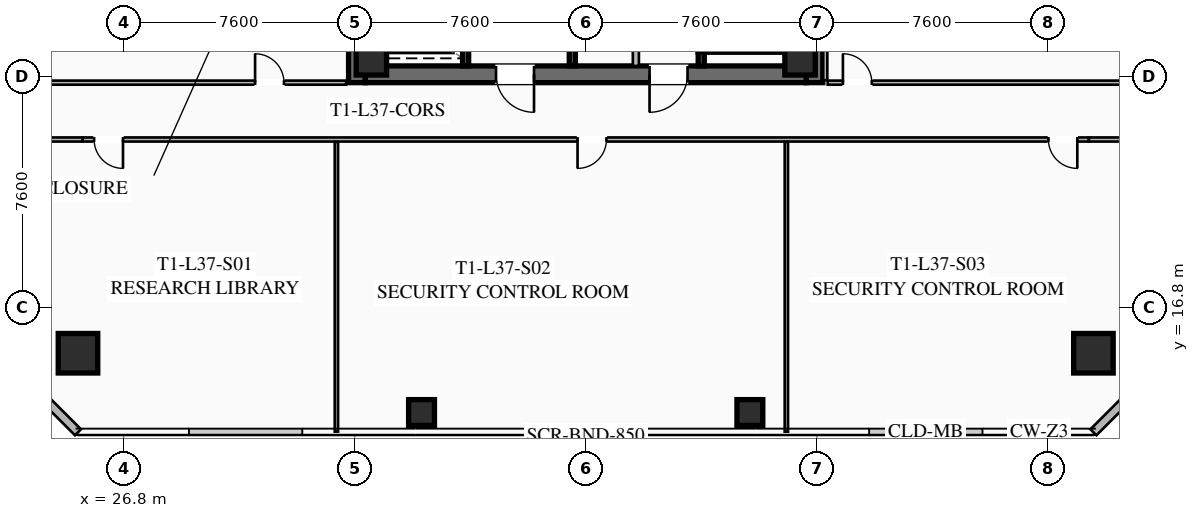
"""IFC4 building model, lengths in metres.
Left out: names, types, materials, properties, quantities, classifications, styles, units other than length and angle.
Written with IfcOpenShell. Run it as: python <this file> out.ifc"""

import sys

from ifc_helpers import new_model, si_unit, direction, frame, frame_2d, origin, origin_2d, place, context, subcontext, project, spatial, rectangle, hollow_rectangle, extrude, element, fill, save


model = new_model("IFC4")
c1 = context("Model", 3, precision=1e-05, world=origin(), true_north=direction((0.0, 1.0)))
c2 = subcontext(c1, "Body", "Model", "MODEL_VIEW")
j1 = project(units=[si_unit("LENGTHUNIT", "METRE"), si_unit("PLANEANGLEUNIT", "RADIAN")], contexts=[c1])
p1 = place(None, origin())
s1 = spatial("IfcSite", under=j1, at=p1, CompositionType="ELEMENT")
p2 = place(p1, origin())
s2 = spatial("IfcBuilding", under=s1, at=p2, CompositionType="ELEMENT")
p3 = place(p2, frame((0.0, 0.0, 139.25)))
s3 = spatial("IfcBuildingStorey", under=s2, at=p3, CompositionType="ELEMENT", Elevation=139.25)
for number, where, z_axis, x_axis in (
    (1, (34.475, 24.2, 0.0), (0.0, 0.0, 1.0), (0.0, 1.0, 0.0)),
    (2, (49.525, 39.8, 0.0), (0.0, 0.0, 1.0), (0.0, -1.0, 0.0)),
):
    element("IfcWall", number, at=place(p3, frame(where, z_axis=z_axis, x_axis=x_axis)), inside=s3, PredefinedType="SHEAR", context=c2, shape_type="SweptSolid", body=[
        extrude(rectangle(XDim=15.6, YDim=0.55, at=frame_2d((7.8, 0.0))), origin(), (0.0, 0.0, 1.0), 3.55),
    ])
p4 = place(p3, frame((49.25, 24.475, 0.0), z_axis=(0.0, 0.0, 1.0), x_axis=(-1.0, 0.0, 0.0)))
e3 = element("IfcWall", 3, at=p4, inside=s3, PredefinedType="SHEAR", context=c2, shape_type="SweptSolid", body=[
    extrude(rectangle(XDim=14.5, YDim=0.55, at=frame_2d((7.25, 0.0))), origin(), (0.0, 0.0, 1.0), 3.55),
])
p5 = place(p4, frame((8.95, 0.0, 0.0)))
e4 = element("IfcOpeningElement", 4, at=p5, cuts=e3, PredefinedType="OPENING", context=c2, shape_type="SweptSolid", body=[
    extrude(rectangle(XDim=1.25, YDim=2.25, at=frame_2d((0.625, 1.125))), frame((0.0, 0.285, 0.0), z_axis=(0.0, -1.0, 0.0), x_axis=(1.0, 0.0, 0.0)), (0.0, 0.0, 1.0), 0.57),
])
p6 = place(p4, frame((3.9, 0.0, 0.0)))
e5 = element("IfcOpeningElement", 5, at=p6, cuts=e3, PredefinedType="OPENING", context=c2, shape_type="SweptSolid", body=[
    extrude(rectangle(XDim=1.25, YDim=2.25, at=frame_2d((0.625, 1.125))), frame((0.0, 0.285, 0.0), z_axis=(0.0, -1.0, 0.0), x_axis=(1.0, 0.0, 0.0)), (0.0, 0.0, 1.0), 0.57),
])
for number, where, z_axis, x_axis in (
    (6, (34.95, 24.95, 0.0), (0.0, 0.0, 1.0), (1.0, 0.0, 0.0)),
    (7, (49.05, 24.95, 0.0), (0.0, 0.0, 1.0), (1.0, 0.0, 0.0)),
):
    element("IfcColumn", number, at=place(p3, frame(where, z_axis=z_axis, x_axis=x_axis)), inside=s3, PredefinedType="COLUMN", context=c2, shape_type="SweptSolid", body=[
        extrude(hollow_rectangle(XDim=1.0, YDim=1.0, WallThickness=0.04, at=origin_2d()), origin(), (0.0, 0.0, 1.0), 3.37),
    ])
for number, where, z_axis, x_axis in (
    (8, (25.3, 15.3, 0.0), (0.0, 0.0, 1.0), (1.0, 0.0, 0.0)),
    (9, (58.7, 15.3, 0.0), (0.0, 0.0, 1.0), (1.0, 0.0, 0.0)),
):
    element("IfcColumn", number, at=place(p3, frame(where, z_axis=z_axis, x_axis=x_axis)), inside=s3, PredefinedType="COLUMN", context=c2, shape_type="SweptSolid", body=[
        extrude(hollow_rectangle(XDim=1.3, YDim=1.3, WallThickness=0.05, at=origin_2d()), origin(), (0.0, 0.0, 1.0), 3.37),
    ])
for number, where, z_axis, x_axis in (
    (10, (36.6, 13.35, 0.0), (0.0, 0.0, 1.0), (1.0, 0.0, 0.0)),
    (11, (47.4, 13.35, 0.0), (0.0, 0.0, 1.0), (1.0, 0.0, 0.0)),
):
    element("IfcColumn", number, at=place(p3, frame(where, z_axis=z_axis, x_axis=x_axis)), inside=s3, PredefinedType="COLUMN", context=c2, shape_type="SweptSolid", body=[
        extrude(hollow_rectangle(XDim=0.85, YDim=0.85, WallThickness=0.035, at=origin_2d()), origin(), (0.0, 0.0, 1.0), 3.37),
    ])
for number, where, z_axis, x_axis in (
    (12, (25.3, 12.7, 0.0), (0.0, 0.0, 1.0), (-0.707, 0.707, 0.0)),
    (13, (61.3, 15.3, 0.0), (0.0, 0.0, 1.0), (-0.707, -0.707, 0.0)),
):
    element("IfcWall", number, at=place(p3, frame(where, z_axis=z_axis, x_axis=x_axis)), inside=s3, PredefinedType="SOLIDWALL", context=c2, shape_type="SweptSolid", body=[
        extrude(rectangle(XDim=3.677, YDim=0.28, at=frame_2d((1.838, 0.0))), origin(), (0.0, 0.0, 1.0), 3.37),
    ])
p7 = place(p3, frame((45.8, 32.8, 0.0), z_axis=(0.0, 0.0, 1.0), x_axis=(0.0, -1.0, 0.0)))
e14 = element("IfcWall", 14, at=p7, inside=s3, PredefinedType="SHEAR", context=c2, shape_type="SweptSolid", body=[
    extrude(rectangle(XDim=8.05, YDim=0.2, at=frame_2d((4.025, 0.0))), origin(), (0.0, 0.0, 1.0), 3.37),
])
p8 = place(p7, frame((0.45, 0.0, 0.0)))
e15 = element("IfcOpeningElement", 15, at=p8, cuts=e14, PredefinedType="OPENING", context=c2, shape_type="SweptSolid", body=[
    extrude(rectangle(XDim=1.15, YDim=2.2, at=frame_2d((0.575, 1.1))), frame((0.0, 0.11, 0.0), z_axis=(0.0, -1.0, 0.0), x_axis=(1.0, 0.0, 0.0)), (0.0, 0.0, 1.0), 0.22),
])
p9 = place(p3, frame((41.56, 24.75, 0.0), z_axis=(0.0, 0.0, 1.0), x_axis=(0.0, 1.0, 0.0)))
e16 = element("IfcWall", 16, at=p9, inside=s3, PredefinedType="SHEAR", context=c2, shape_type="SweptSolid", body=[
    extrude(rectangle(XDim=14.5, YDim=0.2, at=frame_2d((7.25, 0.0))), origin(), (0.0, 0.0, 1.0), 3.37),
])
p10 = place(p3, frame((38.05, 24.75, 0.0), z_axis=(0.0, 0.0, 1.0), x_axis=(0.0, 1.0, 0.0)))
e17 = element("IfcWall", 17, at=p10, inside=s3, PredefinedType="SHEAR", context=c2, shape_type="SweptSolid", body=[
    extrude(rectangle(XDim=6.45, YDim=0.2, at=frame_2d((3.225, 0.0))), origin(), (0.0, 0.0, 1.0), 3.37),
])
p11 = place(p10, frame((4.875, 0.0, 0.0)))
e18 = element("IfcOpeningElement", 18, at=p11, cuts=e17, PredefinedType="OPENING", context=c2, shape_type="SweptSolid", body=[
    extrude(rectangle(XDim=1.3, YDim=2.25, at=frame_2d((0.65, 1.125))), frame((0.0, 0.11, 0.0), z_axis=(0.0, -1.0, 0.0), x_axis=(1.0, 0.0, 0.0)), (0.0, 0.0, 1.0), 0.22),
])
p12 = place(p10, frame((2.875, 0.0, 0.0)))
e19 = element("IfcOpeningElement", 19, at=p12, cuts=e17, PredefinedType="OPENING", context=c2, shape_type="SweptSolid", body=[
    extrude(rectangle(XDim=1.3, YDim=2.25, at=frame_2d((0.65, 1.125))), frame((0.0, 0.11, 0.0), z_axis=(0.0, -1.0, 0.0), x_axis=(1.0, 0.0, 0.0)), (0.0, 0.0, 1.0), 0.22),
])
p13 = place(p10, frame((0.675, 0.0, 0.0)))
e20 = element("IfcOpeningElement", 20, at=p13, cuts=e17, PredefinedType="OPENING", context=c2, shape_type="SweptSolid", body=[
    extrude(rectangle(XDim=1.3, YDim=2.25, at=frame_2d((0.65, 1.125))), frame((0.0, 0.11, 0.0), z_axis=(0.0, -1.0, 0.0), x_axis=(1.0, 0.0, 0.0)), (0.0, 0.0, 1.0), 0.22),
])
p14 = place(p3, frame((43.65, 24.75, 0.0), z_axis=(0.0, 0.0, 1.0), x_axis=(0.0, 1.0, 0.0)))
e21 = element("IfcWall", 21, at=p14, inside=s3, PredefinedType="SOLIDWALL", context=c2, shape_type="SweptSolid", body=[
    extrude(rectangle(XDim=6.9, YDim=0.2, at=frame_2d((3.45, 0.0))), origin(), (0.0, 0.0, 1.0), 2.723),
])
p15 = place(p14, frame((0.85, 0.0, 0.0)))
e22 = element("IfcOpeningElement", 22, at=p15, cuts=e21, PredefinedType="OPENING", context=c2, shape_type="SweptSolid", body=[
    extrude(rectangle(XDim=0.95, YDim=2.05, at=frame_2d((0.475, 1.025))), frame((0.0, 0.11, 0.0), z_axis=(0.0, -1.0, 0.0), x_axis=(1.0, 0.0, 0.0)), (0.0, 0.0, 1.0), 0.22),
])
p16 = place(p14, frame((4.8, 0.0, 0.0)))
e23 = element("IfcOpeningElement", 23, at=p16, cuts=e21, PredefinedType="OPENING", context=c2, shape_type="SweptSolid", body=[
    extrude(rectangle(XDim=1.05, YDim=2.2, at=frame_2d((0.525, 1.1))), frame((0.0, 0.11, 0.0), z_axis=(0.0, -1.0, 0.0), x_axis=(1.0, 0.0, 0.0)), (0.0, 0.0, 1.0), 0.22),
])
p17 = place(p3, frame((58.55, 22.33, 0.0), z_axis=(0.0, 0.0, 1.0), x_axis=(-1.0, 0.0, 0.0)))
e24 = element("IfcWall", 24, at=p17, inside=s3, PredefinedType="PARTITIONING", context=c2, shape_type="SweptSolid", body=[
    extrude(rectangle(XDim=33.1, YDim=0.135, at=frame_2d((16.55, 0.0))), origin(), (0.0, 0.0, 1.0), 2.723),
])
p18 = place(p17, frame((31.77, 0.0, 0.0)))
e25 = element("IfcOpeningElement", 25, at=p18, cuts=e24, PredefinedType="OPENING", context=c2, shape_type="SweptSolid", body=[
    extrude(rectangle(XDim=0.95, YDim=2.05, at=frame_2d((0.475, 1.025))), frame((0.0, 0.077, 0.0), z_axis=(0.0, -1.0, 0.0), x_axis=(1.0, 0.0, 0.0)), (0.0, 0.0, 1.0), 0.155),
])
p19 = place(p17, frame((15.868, 0.0, 0.0)))
e26 = element("IfcOpeningElement", 26, at=p19, cuts=e24, PredefinedType="OPENING", context=c2, shape_type="SweptSolid", body=[
    extrude(rectangle(XDim=0.95, YDim=2.05, at=frame_2d((0.475, 1.025))), frame((0.0, 0.077, 0.0), z_axis=(0.0, -1.0, 0.0), x_axis=(1.0, 0.0, 0.0)), (0.0, 0.0, 1.0), 0.155),
])
p20 = place(p17, frame((0.38, 0.0, 0.0)))
e27 = element("IfcOpeningElement", 27, at=p20, cuts=e24, PredefinedType="OPENING", context=c2, shape_type="SweptSolid", body=[
    extrude(rectangle(XDim=0.95, YDim=2.05, at=frame_2d((0.475, 1.025))), frame((0.0, 0.077, 0.0), z_axis=(0.0, -1.0, 0.0), x_axis=(1.0, 0.0, 0.0)), (0.0, 0.0, 1.0), 0.155),
])
for number, where, z_axis, x_axis in (
    (28, (22.72, 22.33, 0.0), (0.0, 0.0, 1.0), (1.0, 0.0, 0.0)),
    (29, (58.55, 22.33, 0.0), (0.0, 0.0, 1.0), (1.0, 0.0, 0.0)),
):
    element("IfcWall", number, at=place(p3, frame(where, z_axis=z_axis, x_axis=x_axis)), inside=s3, PredefinedType="PARTITIONING", context=c2, shape_type="SweptSolid", body=[
        extrude(rectangle(XDim=2.73, YDim=0.135, at=frame_2d((1.365, 0.0))), origin(), (0.0, 0.0, 1.0), 2.723),
    ])
for number, where, z_axis, x_axis in (
    (30, (33.8, 12.72, 0.0), (0.0, 0.0, 1.0), (0.0, 1.0, 0.0)),
    (31, (48.6, 12.72, 0.0), (0.0, 0.0, 1.0), (0.0, 1.0, 0.0)),
):
    element("IfcWall", number, at=place(p3, frame(where, z_axis=z_axis, x_axis=x_axis)), inside=s3, PredefinedType="PARTITIONING", context=c2, shape_type="SweptSolid", body=[
        extrude(rectangle(XDim=9.53, YDim=0.11, at=frame_2d((4.765, 0.0))), origin(), (0.0, 0.0, 1.0), 2.723),
    ])
p21 = place(p3, frame((49.88, 39.72, 0.0), z_axis=(0.0, 0.0, 1.0), x_axis=(0.0, -1.0, 0.0)))
e32 = element("IfcWall", 32, at=p21, inside=s3, PredefinedType="PARTITIONING", context=c2, shape_type="SweptSolid", body=[
    extrude(rectangle(XDim=15.44, YDim=0.135, at=frame_2d((7.72, 0.0))), origin(), (0.0, 0.0, 1.0), 2.723),
])
p22 = place(p3, frame((49.96, 24.2, 0.0), z_axis=(0.0, 0.0, 1.0), x_axis=(1.0, 0.0, 0.0)))
e33 = element("IfcWall", 33, at=p22, inside=s3, PredefinedType="PARTITIONING", context=c2, shape_type="SweptSolid", body=[
    extrude(rectangle(XDim=11.32, YDim=0.135, at=frame_2d((5.66, 0.0))), origin(), (0.0, 0.0, 1.0), 2.723),
])
p23 = place(p22, frame((0.5, 0.0, 0.0)))
e34 = element("IfcOpeningElement", 34, at=p23, cuts=e33, PredefinedType="OPENING", context=c2, shape_type="SweptSolid", body=[
    extrude(rectangle(XDim=0.95, YDim=2.05, at=frame_2d((0.475, 1.025))), frame((0.0, 0.077, 0.0), z_axis=(0.0, -1.0, 0.0), x_axis=(1.0, 0.0, 0.0)), (0.0, 0.0, 1.0), 0.155),
])
p24 = place(p3, frame((22.72, 24.2, 0.0), z_axis=(0.0, 0.0, 1.0), x_axis=(1.0, 0.0, 0.0)))
e35 = element("IfcWall", 35, at=p24, inside=s3, PredefinedType="PARTITIONING", context=c2, shape_type="SweptSolid", body=[
    extrude(rectangle(XDim=11.4, YDim=0.135, at=frame_2d((5.7, 0.0))), origin(), (0.0, 0.0, 1.0), 2.723),
])
p25 = place(p24, frame((8.405, 0.0, 0.0)))
e36 = element("IfcOpeningElement", 36, at=p25, cuts=e35, PredefinedType="OPENING", context=c2, shape_type="SweptSolid", body=[
    extrude(rectangle(XDim=0.95, YDim=2.05, at=frame_2d((0.475, 1.025))), frame((0.0, 0.077, 0.0), z_axis=(0.0, -1.0, 0.0), x_axis=(1.0, 0.0, 0.0)), (0.0, 0.0, 1.0), 0.155),
])
p26 = place(p5, origin())
e37 = element("IfcDoor", 37, at=p26, inside=s3, OperationType="SINGLE_SWING_LEFT", PredefinedType="DOOR", context=c2, shape_type="SweptSolid", body=[
    extrude(rectangle(XDim=1.25, YDim=2.25, at=frame_2d((0.625, 1.125))), frame((0.0, 0.025, 0.0), z_axis=(0.0, -1.0, 0.0), x_axis=(1.0, 0.0, 0.0)), (0.0, 0.0, 1.0), 0.05),
])
fill(e4, e37)
p27 = place(p6, origin())
e38 = element("IfcDoor", 38, at=p27, inside=s3, OperationType="SINGLE_SWING_RIGHT", PredefinedType="DOOR", context=c2, shape_type="SweptSolid", body=[
    extrude(rectangle(XDim=1.25, YDim=2.25, at=frame_2d((0.625, 1.125))), frame((0.0, 0.025, 0.0), z_axis=(0.0, -1.0, 0.0), x_axis=(1.0, 0.0, 0.0)), (0.0, 0.0, 1.0), 0.05),
])
fill(e5, e38)
p28 = place(p18, origin())
e39 = element("IfcDoor", 39, at=p28, inside=s3, OperationType="SINGLE_SWING_LEFT", PredefinedType="DOOR", context=c2, shape_type="SweptSolid", body=[
    extrude(rectangle(XDim=0.95, YDim=2.05, at=frame_2d((0.475, 1.025))), frame((0.0, 0.025, 0.0), z_axis=(0.0, -1.0, 0.0), x_axis=(1.0, 0.0, 0.0)), (0.0, 0.0, 1.0), 0.05),
])
fill(e25, e39)
p29 = place(p19, origin())
e40 = element("IfcDoor", 40, at=p29, inside=s3, OperationType="SINGLE_SWING_RIGHT", PredefinedType="DOOR", context=c2, shape_type="SweptSolid", body=[
    extrude(rectangle(XDim=0.95, YDim=2.05, at=frame_2d((0.475, 1.025))), frame((0.0, 0.025, 0.0), z_axis=(0.0, -1.0, 0.0), x_axis=(1.0, 0.0, 0.0)), (0.0, 0.0, 1.0), 0.05),
])
fill(e26, e40)
p30 = place(p20, origin())
e41 = element("IfcDoor", 41, at=p30, inside=s3, OperationType="SINGLE_SWING_LEFT", PredefinedType="DOOR", context=c2, shape_type="SweptSolid", body=[
    extrude(rectangle(XDim=0.95, YDim=2.05, at=frame_2d((0.475, 1.025))), frame((0.0, 0.025, 0.0), z_axis=(0.0, -1.0, 0.0), x_axis=(1.0, 0.0, 0.0)), (0.0, 0.0, 1.0), 0.05),
])
fill(e27, e41)
p31 = place(p23, origin())
e42 = element("IfcDoor", 42, at=p31, inside=s3, OperationType="SINGLE_SWING_LEFT", PredefinedType="DOOR", context=c2, shape_type="SweptSolid", body=[
    extrude(rectangle(XDim=0.95, YDim=2.05, at=frame_2d((0.475, 1.025))), frame((0.0, 0.025, 0.0), z_axis=(0.0, -1.0, 0.0), x_axis=(1.0, 0.0, 0.0)), (0.0, 0.0, 1.0), 0.05),
])
fill(e34, e42)
p32 = place(p25, origin())
e43 = element("IfcDoor", 43, at=p32, inside=s3, OperationType="SINGLE_SWING_LEFT", PredefinedType="DOOR", context=c2, shape_type="SweptSolid", body=[
    extrude(rectangle(XDim=0.95, YDim=2.05, at=frame_2d((0.475, 1.025))), frame((0.0, 0.025, 0.0), z_axis=(0.0, -1.0, 0.0), x_axis=(1.0, 0.0, 0.0)), (0.0, 0.0, 1.0), 0.05),
])
fill(e36, e43)
save(model, sys.argv[1])
